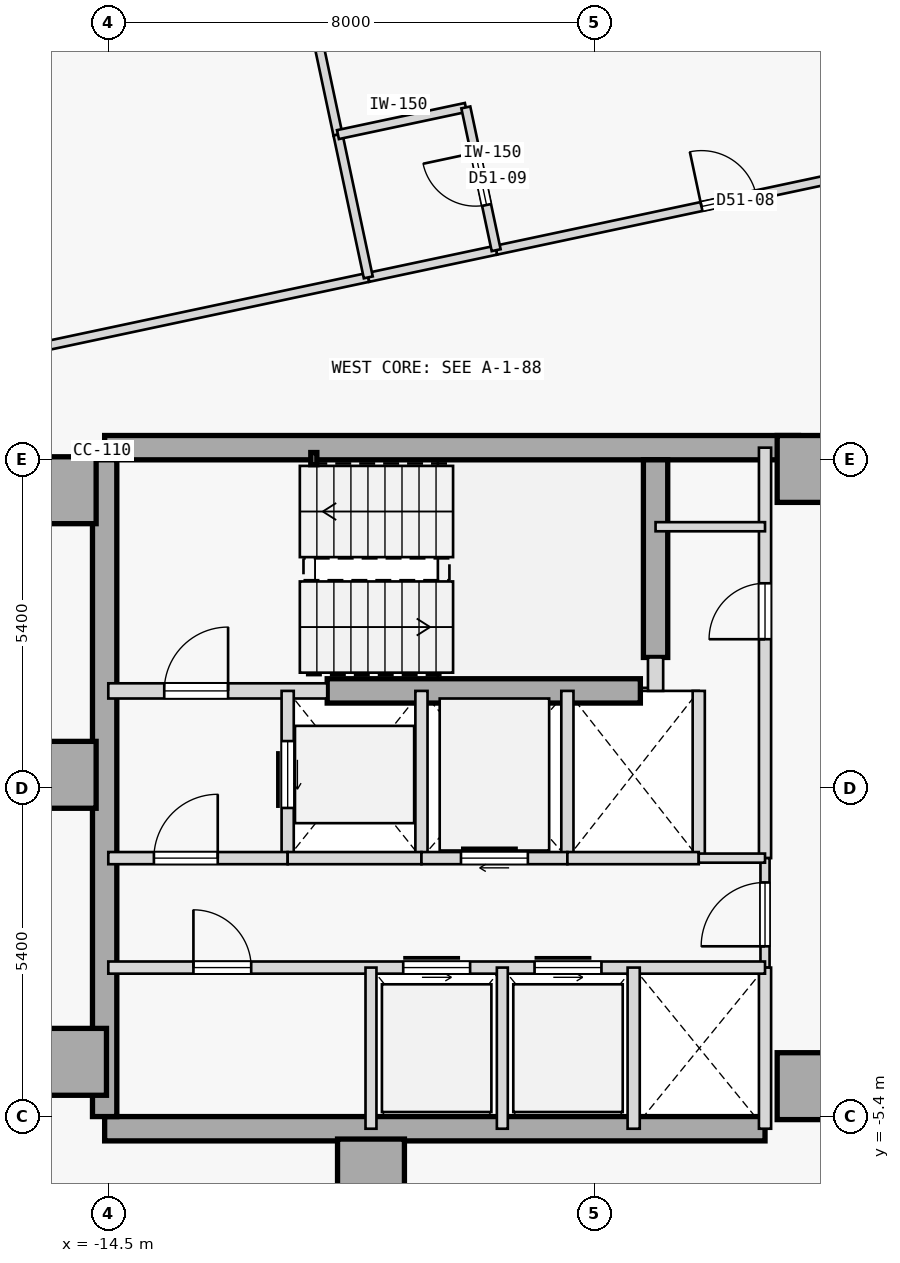
"""IFC4 building model, lengths in metres.
Left out: names, types, materials, properties, quantities, classifications, styles, units other than length and angle.
Written with IfcOpenShell. Run it as: python <this file> out.ifc"""

import sys

from ifc_helpers import new_model, si_unit, direction, frame, frame_2d, origin, origin_2d, place, context, subcontext, project, spatial, rectangle, hollow_rectangle, extrude, element, fill, save


model = new_model("IFC4")
c1 = context("Model", 3, precision=1e-05, world=origin(), true_north=direction((0.0, 1.0)))
c2 = subcontext(c1, "Body", "Model", "MODEL_VIEW")
j1 = project(units=[si_unit("LENGTHUNIT", "METRE"), si_unit("PLANEANGLEUNIT", "RADIAN")], contexts=[c1])
p1 = place(None, origin())
s1 = spatial("IfcSite", under=j1, at=p1, CompositionType="ELEMENT")
p2 = place(p1, origin())
s2 = spatial("IfcBuilding", under=s1, at=p2, CompositionType="ELEMENT")
p3 = place(p2, frame((0.0, 0.0, 195.6)))
s3 = spatial("IfcBuildingStorey", under=s2, at=p3, CompositionType="ELEMENT", Elevation=195.6)
for number, where, z_axis, x_axis in (
    (1, (-15.25, 4.9, 0.0), (0.0, 0.0, 1.0), (1.0, 0.0, 0.0)),
    (2, (-15.25, 0.22, 0.0), (0.0, 0.0, 1.0), (1.0, 0.0, 0.0)),
    (3, (-15.08, -4.5, 0.0), (0.0, 0.0, 1.0), (1.0, 0.0, 0.0)),
    (4, (-10.18, -6.32, 0.0), (0.0, 0.0, 1.0), (1.0, 0.0, 0.0)),
    (5, (-2.95, -4.9, 0.0), (0.0, 0.0, 1.0), (1.0, 0.0, 0.0)),
    (6, (-2.95, 5.25, 0.0), (0.0, 0.0, 1.0), (1.0, 0.0, 0.0)),
):
    element("IfcColumn", number, at=place(p3, frame(where, z_axis=z_axis, x_axis=x_axis)), inside=s3, PredefinedType="COLUMN", context=c2, shape_type="SweptSolid", body=[
        extrude(rectangle(XDim=1.1, YDim=1.1, at=origin_2d()), origin(), (0.0, 0.0, 1.0), 3.4),
    ])
p4 = place(p3, frame((-14.56, 5.6, 0.0), z_axis=(0.0, 0.0, 1.0), x_axis=(1.0, 0.0, 0.0)))
e7 = element("IfcWall", 7, at=p4, inside=s3, PredefinedType="SHEAR", context=c2, shape_type="SweptSolid", body=[
    extrude(rectangle(XDim=11.41, YDim=0.4, at=frame_2d((5.705, 0.0))), origin(), (0.0, 0.0, 1.0), 3.175),
])
p5 = place(p3, frame((-14.56, -5.6, 0.0), z_axis=(0.0, 0.0, 1.0), x_axis=(1.0, 0.0, 0.0)))
e8 = element("IfcWall", 8, at=p5, inside=s3, PredefinedType="SHEAR", context=c2, shape_type="SweptSolid", body=[
    extrude(rectangle(XDim=10.86, YDim=0.4, at=frame_2d((5.43, 0.0))), origin(), (0.0, 0.0, 1.0), 3.175),
])
p6 = place(p3, frame((-14.56, -5.4, 0.0), z_axis=(0.0, 0.0, 1.0), x_axis=(0.0, 1.0, 0.0)))
e9 = element("IfcWall", 9, at=p6, inside=s3, PredefinedType="SHEAR", context=c2, shape_type="SweptSolid", body=[
    extrude(rectangle(XDim=10.8, YDim=0.4, at=frame_2d((5.4, 0.0))), origin(), (0.0, 0.0, 1.0), 3.175),
])
p7 = place(p3, frame((-5.5, 2.15, 0.0), z_axis=(0.0, 0.0, 1.0), x_axis=(0.0, 1.0, 0.0)))
e10 = element("IfcWall", 10, at=p7, inside=s3, PredefinedType="SHEAR", context=c2, shape_type="SweptSolid", body=[
    extrude(rectangle(XDim=3.25, YDim=0.4, at=frame_2d((1.625, 0.0))), origin(), (0.0, 0.0, 1.0), 3.175),
])
p8 = place(p3, frame((-10.9, 1.6, 0.0), z_axis=(0.0, 0.0, 1.0), x_axis=(1.0, 0.0, 0.0)))
e11 = element("IfcWall", 11, at=p8, inside=s3, PredefinedType="SHEAR", context=c2, shape_type="SweptSolid", body=[
    extrude(rectangle(XDim=5.15, YDim=0.4, at=frame_2d((2.575, 0.0))), origin(), (0.0, 0.0, 1.0), 3.175),
])
p9 = place(p3, frame((-11.12, 5.42, 0.0), z_axis=(0.0, 0.0, 1.0), x_axis=(1.0, 0.0, 0.0)))
e12 = element("IfcColumn", 12, at=p9, inside=s3, PredefinedType="COLUMN", context=c2, shape_type="SweptSolid", body=[
    extrude(hollow_rectangle(XDim=0.1, YDim=0.2, WallThickness=0.008, at=origin_2d()), origin(), (0.0, 0.0, 1.0), 3.4),
])
p10 = place(p3, frame((-14.5, 1.6, 0.0), z_axis=(0.0, 0.0, 1.0), x_axis=(1.0, 0.0, 0.0)))
e13 = element("IfcWall", 13, at=p10, inside=s3, PredefinedType="STANDARD", context=c2, shape_type="SweptSolid", body=[
    extrude(rectangle(XDim=3.6, YDim=0.25, at=frame_2d((1.8, 0.0))), origin(), (0.0, 0.0, 1.0), 3.175),
])
p11 = place(p10, frame((0.92, 0.0, 0.0)))
e14 = element("IfcOpeningElement", 14, at=p11, cuts=e13, PredefinedType="OPENING", context=c2, shape_type="SweptSolid", body=[
    extrude(rectangle(XDim=1.05, YDim=2.15, at=frame_2d((0.525, 1.075))), frame((0.0, 0.135, 0.0), z_axis=(0.0, -1.0, 0.0), x_axis=(1.0, 0.0, 0.0)), (0.0, 0.0, 1.0), 0.27),
])
p12 = place(p3, frame((-5.5, 1.6, 0.0), z_axis=(0.0, 0.0, 1.0), x_axis=(0.0, 1.0, 0.0)))
e15 = element("IfcWall", 15, at=p12, inside=s3, PredefinedType="STANDARD", context=c2, shape_type="SweptSolid", body=[
    extrude(rectangle(XDim=0.55, YDim=0.25, at=frame_2d((0.275, 0.0))), origin(), (0.0, 0.0, 1.0), 3.175),
])
p13 = place(p3, frame((-3.7, -1.15, 0.0), z_axis=(0.0, 0.0, 1.0), x_axis=(0.0, 1.0, 0.0)))
e16 = element("IfcWall", 16, at=p13, inside=s3, PredefinedType="STANDARD", context=c2, shape_type="SweptSolid", body=[
    extrude(rectangle(XDim=6.75, YDim=0.2, at=frame_2d((3.375, 0.0))), origin(), (0.0, 0.0, 1.0), 3.175),
])
p14 = place(p13, frame((3.6, 0.0, 0.0)))
e17 = element("IfcOpeningElement", 17, at=p14, cuts=e16, PredefinedType="OPENING", context=c2, shape_type="SweptSolid", body=[
    extrude(rectangle(XDim=0.92, YDim=2.15, at=frame_2d((0.46, 1.075))), frame((0.0, 0.11, 0.0), z_axis=(0.0, -1.0, 0.0), x_axis=(1.0, 0.0, 0.0)), (0.0, 0.0, 1.0), 0.22),
])
p15 = place(p3, frame((-3.7, -2.95, 0.0), z_axis=(0.0, 0.0, 1.0), x_axis=(0.0, 1.0, 0.0)))
e18 = element("IfcWall", 18, at=p15, inside=s3, PredefinedType="PARTITIONING", context=c2, shape_type="SweptSolid", body=[
    extrude(rectangle(XDim=1.8, YDim=0.15, at=frame_2d((0.9, 0.0))), origin(), (0.0, 0.0, 1.0), 3.175),
])
p16 = place(p15, frame((0.35, 0.0, 0.0)))
e19 = element("IfcOpeningElement", 19, at=p16, cuts=e18, PredefinedType="OPENING", context=c2, shape_type="SweptSolid", body=[
    extrude(rectangle(XDim=1.05, YDim=2.18, at=frame_2d((0.525, 1.09))), frame((0.0, 0.085, 0.0), z_axis=(0.0, -1.0, 0.0), x_axis=(1.0, 0.0, 0.0)), (0.0, 0.0, 1.0), 0.17),
])
p17 = place(p3, frame((-3.7, -5.6, 0.0), z_axis=(0.0, 0.0, 1.0), x_axis=(0.0, 1.0, 0.0)))
e20 = element("IfcWall", 20, at=p17, inside=s3, PredefinedType="STANDARD", context=c2, shape_type="SweptSolid", body=[
    extrude(rectangle(XDim=2.65, YDim=0.2, at=frame_2d((1.325, 0.0))), origin(), (0.0, 0.0, 1.0), 3.175),
])
p18 = place(p3, frame((-11.55, -1.15, 0.0), z_axis=(0.0, 0.0, 1.0), x_axis=(0.0, 1.0, 0.0)))
e21 = element("IfcWall", 21, at=p18, inside=s3, PredefinedType="STANDARD", context=c2, shape_type="SweptSolid", body=[
    extrude(rectangle(XDim=2.75, YDim=0.2, at=frame_2d((1.375, 0.0))), origin(), (0.0, 0.0, 1.0), 3.175),
])
p19 = place(p18, frame((0.825, 0.0, 0.0)))
e22 = element("IfcOpeningElement", 22, at=p19, cuts=e21, PredefinedType="OPENING", context=c2, shape_type="SweptSolid", body=[
    extrude(rectangle(XDim=1.1, YDim=2.15, at=frame_2d((0.55, 1.075))), frame((0.0, 0.11, 0.0), z_axis=(0.0, -1.0, 0.0), x_axis=(1.0, 0.0, 0.0)), (0.0, 0.0, 1.0), 0.22),
])
p20 = place(p3, frame((-9.35, -1.15, 0.0), z_axis=(0.0, 0.0, 1.0), x_axis=(0.0, 1.0, 0.0)))
e23 = element("IfcWall", 23, at=p20, inside=s3, PredefinedType="STANDARD", context=c2, shape_type="SweptSolid", body=[
    extrude(rectangle(XDim=2.75, YDim=0.2, at=frame_2d((1.375, 0.0))), origin(), (0.0, 0.0, 1.0), 3.175),
])
p21 = place(p3, frame((-14.5, -1.15, 0.0), z_axis=(0.0, 0.0, 1.0), x_axis=(1.0, 0.0, 0.0)))
e24 = element("IfcWall", 24, at=p21, inside=s3, PredefinedType="STANDARD", context=c2, shape_type="SweptSolid", body=[
    extrude(rectangle(XDim=2.95, YDim=0.2, at=frame_2d((1.475, 0.0))), origin(), (0.0, 0.0, 1.0), 3.175),
])
p22 = place(p21, frame((0.75, 0.0, 0.0)))
e25 = element("IfcOpeningElement", 25, at=p22, cuts=e24, PredefinedType="OPENING", context=c2, shape_type="SweptSolid", body=[
    extrude(rectangle(XDim=1.05, YDim=2.18, at=frame_2d((0.525, 1.09))), frame((0.0, 0.11, 0.0), z_axis=(0.0, -1.0, 0.0), x_axis=(1.0, 0.0, 0.0)), (0.0, 0.0, 1.0), 0.22),
])
p23 = place(p3, frame((-11.55, -1.15, 0.0), z_axis=(0.0, 0.0, 1.0), x_axis=(1.0, 0.0, 0.0)))
e26 = element("IfcWall", 26, at=p23, inside=s3, PredefinedType="STANDARD", context=c2, shape_type="SweptSolid", body=[
    extrude(rectangle(XDim=2.2, YDim=0.2, at=frame_2d((1.1, 0.0))), origin(), (0.0, 0.0, 1.0), 3.175),
])
p24 = place(p3, frame((-6.95, -1.15, 0.0), z_axis=(0.0, 0.0, 1.0), x_axis=(0.0, 1.0, 0.0)))
e27 = element("IfcWall", 27, at=p24, inside=s3, PredefinedType="STANDARD", context=c2, shape_type="SweptSolid", body=[
    extrude(rectangle(XDim=2.75, YDim=0.2, at=frame_2d((1.375, 0.0))), origin(), (0.0, 0.0, 1.0), 3.175),
])
p25 = place(p3, frame((-9.35, -1.15, 0.0), z_axis=(0.0, 0.0, 1.0), x_axis=(1.0, 0.0, 0.0)))
e28 = element("IfcWall", 28, at=p25, inside=s3, PredefinedType="STANDARD", context=c2, shape_type="SweptSolid", body=[
    extrude(rectangle(XDim=2.4, YDim=0.2, at=frame_2d((1.2, 0.0))), origin(), (0.0, 0.0, 1.0), 3.175),
])
p26 = place(p25, frame((0.65, 0.0, 0.0)))
e29 = element("IfcOpeningElement", 29, at=p26, cuts=e28, PredefinedType="OPENING", context=c2, shape_type="SweptSolid", body=[
    extrude(rectangle(XDim=1.1, YDim=2.15, at=frame_2d((0.55, 1.075))), frame((0.0, 0.11, 0.0), z_axis=(0.0, -1.0, 0.0), x_axis=(1.0, 0.0, 0.0)), (0.0, 0.0, 1.0), 0.22),
])
p27 = place(p3, frame((-4.79, -1.15, 0.0), z_axis=(0.0, 0.0, 1.0), x_axis=(0.0, 1.0, 0.0)))
e30 = element("IfcWall", 30, at=p27, inside=s3, PredefinedType="STANDARD", context=c2, shape_type="SweptSolid", body=[
    extrude(rectangle(XDim=2.75, YDim=0.2, at=frame_2d((1.375, 0.0))), origin(), (0.0, 0.0, 1.0), 3.175),
])
p28 = place(p3, frame((-6.95, -1.15, 0.0), z_axis=(0.0, 0.0, 1.0), x_axis=(1.0, 0.0, 0.0)))
e31 = element("IfcWall", 31, at=p28, inside=s3, PredefinedType="STANDARD", context=c2, shape_type="SweptSolid", body=[
    extrude(rectangle(XDim=2.16, YDim=0.2, at=frame_2d((1.08, 0.0))), origin(), (0.0, 0.0, 1.0), 3.175),
])
p29 = place(p3, frame((-4.79, -1.15, 0.0), z_axis=(0.0, 0.0, 1.0), x_axis=(1.0, 0.0, 0.0)))
e32 = element("IfcWall", 32, at=p29, inside=s3, PredefinedType="PARTITIONING", context=c2, shape_type="SweptSolid", body=[
    extrude(rectangle(XDim=1.09, YDim=0.15, at=frame_2d((0.545, 0.0))), origin(), (0.0, 0.0, 1.0), 3.175),
])
p30 = place(p3, frame((-14.5, -2.95, 0.0), z_axis=(0.0, 0.0, 1.0), x_axis=(1.0, 0.0, 0.0)))
e33 = element("IfcWall", 33, at=p30, inside=s3, PredefinedType="STANDARD", context=c2, shape_type="SweptSolid", body=[
    extrude(rectangle(XDim=10.8, YDim=0.2, at=frame_2d((5.4, 0.0))), origin(), (0.0, 0.0, 1.0), 3.175),
])
p31 = place(p30, frame((4.85, 0.0, 0.0)))
e34 = element("IfcOpeningElement", 34, at=p31, cuts=e33, PredefinedType="OPENING", context=c2, shape_type="SweptSolid", body=[
    extrude(rectangle(XDim=1.1, YDim=2.15, at=frame_2d((0.55, 1.075))), frame((0.0, 0.11, 0.0), z_axis=(0.0, -1.0, 0.0), x_axis=(1.0, 0.0, 0.0)), (0.0, 0.0, 1.0), 0.22),
])
p32 = place(p30, frame((7.01, 0.0, 0.0)))
e35 = element("IfcOpeningElement", 35, at=p32, cuts=e33, PredefinedType="OPENING", context=c2, shape_type="SweptSolid", body=[
    extrude(rectangle(XDim=1.1, YDim=2.15, at=frame_2d((0.55, 1.075))), frame((0.0, 0.11, 0.0), z_axis=(0.0, -1.0, 0.0), x_axis=(1.0, 0.0, 0.0)), (0.0, 0.0, 1.0), 0.22),
])
p33 = place(p30, frame((1.4, 0.0, 0.0)))
e36 = element("IfcOpeningElement", 36, at=p33, cuts=e33, PredefinedType="OPENING", context=c2, shape_type="SweptSolid", body=[
    extrude(rectangle(XDim=0.95, YDim=2.15, at=frame_2d((0.475, 1.075))), frame((0.0, 0.11, 0.0), z_axis=(0.0, -1.0, 0.0), x_axis=(1.0, 0.0, 0.0)), (0.0, 0.0, 1.0), 0.22),
])
p34 = place(p3, frame((-5.86, -5.6, 0.0), z_axis=(0.0, 0.0, 1.0), x_axis=(0.0, 1.0, 0.0)))
e37 = element("IfcWall", 37, at=p34, inside=s3, PredefinedType="STANDARD", context=c2, shape_type="SweptSolid", body=[
    extrude(rectangle(XDim=2.65, YDim=0.2, at=frame_2d((1.325, 0.0))), origin(), (0.0, 0.0, 1.0), 3.175),
])
for number, where, z_axis, x_axis in (
    (38, (-10.18, -5.6, 0.0), (0.0, 0.0, 1.0), (0.0, 1.0, 0.0)),
    (39, (-8.02, -5.6, 0.0), (0.0, 0.0, 1.0), (0.0, 1.0, 0.0)),
):
    element("IfcWall", number, at=place(p3, frame(where, z_axis=z_axis, x_axis=x_axis)), inside=s3, PredefinedType="STANDARD", context=c2, shape_type="SweptSolid", body=[
        extrude(rectangle(XDim=2.65, YDim=0.18, at=frame_2d((1.325, 0.0))), origin(), (0.0, 0.0, 1.0), 3.175),
    ])
p35 = place(p3, frame((-5.5, 4.3, 0.0), z_axis=(0.0, 0.0, 1.0), x_axis=(1.0, 0.0, 0.0)))
e40 = element("IfcWall", 40, at=p35, inside=s3, PredefinedType="PARTITIONING", context=c2, shape_type="SweptSolid", body=[
    extrude(rectangle(XDim=1.8, YDim=0.15, at=frame_2d((0.9, 0.0))), origin(), (0.0, 0.0, 1.0), 3.175),
])
p36 = place(p3, frame((-17.162, 6.926, 0.0), z_axis=(0.0, 0.0, 1.0), x_axis=(0.978143627193, 0.207930383978, 0.0)))
e41 = element("IfcWall", 41, at=p36, inside=s3, PredefinedType="PARTITIONING", context=c2, shape_type="SweptSolid", body=[
    extrude(rectangle(XDim=7.093, YDim=0.15, at=frame_2d((3.546, 0.0))), origin(), (0.0, 0.0, 1.0), 3.175),
])
p37 = place(p3, frame((-8.121, 8.848, 0.0), z_axis=(0.0, 0.0, 1.0), x_axis=(0.978146318695, 0.207917722244, 0.0)))
e42 = element("IfcWall", 42, at=p37, inside=s3, PredefinedType="PARTITIONING", context=c2, shape_type="SweptSolid", body=[
    extrude(rectangle(XDim=7.824, YDim=0.15, at=frame_2d((3.912, 0.0))), origin(), (0.0, 0.0, 1.0), 3.175),
])
p38 = place(p37, frame((3.452, 0.0, 0.0)))
e43 = element("IfcOpeningElement", 43, at=p38, cuts=e42, PredefinedType="OPENING", context=c2, shape_type="SweptSolid", body=[
    extrude(rectangle(XDim=0.92, YDim=2.15, at=frame_2d((0.46, 1.075))), frame((0.0, 0.085, 0.0), z_axis=(0.0, -1.0, 0.0), x_axis=(1.0, 0.0, 0.0)), (0.0, 0.0, 1.0), 0.17),
])
p39 = place(p3, frame((-10.224, 8.401, 0.0), z_axis=(0.0, 0.0, 1.0), x_axis=(0.978146728319, 0.207915795165, 0.0)))
e44 = element("IfcWall", 44, at=p39, inside=s3, PredefinedType="PARTITIONING", context=c2, shape_type="SweptSolid", body=[
    extrude(rectangle(XDim=2.15, YDim=0.15, at=frame_2d((1.075, 0.0))), origin(), (0.0, 0.0, 1.0), 3.175),
])
p40 = place(p3, frame((-10.723, 10.748, 0.0), z_axis=(0.0, 0.0, 1.0), x_axis=(-0.207914988081, 0.978146899873, 0.0)))
e45 = element("IfcWall", 45, at=p40, inside=s3, PredefinedType="PARTITIONING", context=c2, shape_type="SweptSolid", body=[
    extrude(rectangle(XDim=11.995, YDim=0.15, at=frame_2d((5.998, 0.0))), origin(), (0.0, 0.0, 1.0), 3.175),
])
p41 = place(p3, frame((-10.224, 8.401, 0.0), z_axis=(0.0, 0.0, 1.0), x_axis=(-0.207917150959, 0.978146440129, 0.0)))
e46 = element("IfcWall", 46, at=p41, inside=s3, PredefinedType="PARTITIONING", context=c2, shape_type="SweptSolid", body=[
    extrude(rectangle(XDim=2.4, YDim=0.15, at=frame_2d((1.2, 0.0))), origin(), (0.0, 0.0, 1.0), 3.175),
])
p42 = place(p3, frame((-10.723, 10.748, 0.0), z_axis=(0.0, 0.0, 1.0), x_axis=(0.978146728319, 0.207915795165, 0.0)))
e47 = element("IfcWall", 47, at=p42, inside=s3, PredefinedType="PARTITIONING", context=c2, shape_type="SweptSolid", body=[
    extrude(rectangle(XDim=2.15, YDim=0.15, at=frame_2d((1.075, 0.0))), origin(), (0.0, 0.0, 1.0), 3.175),
])
p43 = place(p3, frame((-8.121, 8.848, 0.0), z_axis=(0.0, 0.0, 1.0), x_axis=(-0.207917150959, 0.978146440129, 0.0)))
e48 = element("IfcWall", 48, at=p43, inside=s3, PredefinedType="PARTITIONING", context=c2, shape_type="SweptSolid", body=[
    extrude(rectangle(XDim=2.4, YDim=0.15, at=frame_2d((1.2, 0.0))), origin(), (0.0, 0.0, 1.0), 3.175),
])
p44 = place(p43, frame((0.76, 0.0, 0.0)))
e49 = element("IfcOpeningElement", 49, at=p44, cuts=e48, PredefinedType="OPENING", context=c2, shape_type="SweptSolid", body=[
    extrude(rectangle(XDim=0.88, YDim=2.15, at=frame_2d((0.44, 1.075))), frame((0.0, 0.085, 0.0), z_axis=(0.0, -1.0, 0.0), x_axis=(1.0, 0.0, 0.0)), (0.0, 0.0, 1.0), 0.17),
])
p45 = place(p11, origin())
e50 = element("IfcDoor", 50, at=p45, inside=s3, OperationType="SINGLE_SWING_RIGHT", PredefinedType="DOOR", context=c2, shape_type="SweptSolid", body=[
    extrude(rectangle(XDim=1.05, YDim=2.15, at=frame_2d((0.525, 1.075))), frame((0.0, 0.025, 0.0), z_axis=(0.0, -1.0, 0.0), x_axis=(1.0, 0.0, 0.0)), (0.0, 0.0, 1.0), 0.05),
])
fill(e14, e50)
p46 = place(p22, origin())
e51 = element("IfcDoor", 51, at=p46, inside=s3, OperationType="SINGLE_SWING_RIGHT", PredefinedType="DOOR", context=c2, shape_type="SweptSolid", body=[
    extrude(rectangle(XDim=1.05, YDim=2.18, at=frame_2d((0.525, 1.09))), frame((0.0, 0.025, 0.0), z_axis=(0.0, -1.0, 0.0), x_axis=(1.0, 0.0, 0.0)), (0.0, 0.0, 1.0), 0.05),
])
fill(e25, e51)
p47 = place(p16, origin())
e52 = element("IfcDoor", 52, at=p47, inside=s3, OperationType="SINGLE_SWING_LEFT", PredefinedType="DOOR", context=c2, shape_type="SweptSolid", body=[
    extrude(rectangle(XDim=1.05, YDim=2.18, at=frame_2d((0.525, 1.09))), frame((0.0, 0.025, 0.0), z_axis=(0.0, -1.0, 0.0), x_axis=(1.0, 0.0, 0.0)), (0.0, 0.0, 1.0), 0.05),
])
fill(e19, e52)
p48 = place(p19, origin())
e53 = element("IfcDoor", 53, at=p48, inside=s3, OperationType="SLIDING_TO_RIGHT", PredefinedType="DOOR", context=c2, shape_type="SweptSolid", body=[
    extrude(rectangle(XDim=1.1, YDim=2.15, at=frame_2d((0.55, 1.075))), frame((0.0, 0.025, 0.0), z_axis=(0.0, -1.0, 0.0), x_axis=(1.0, 0.0, 0.0)), (0.0, 0.0, 1.0), 0.05),
])
fill(e22, e53)
p49 = place(p26, origin())
e54 = element("IfcDoor", 54, at=p49, inside=s3, OperationType="SLIDING_TO_RIGHT", PredefinedType="DOOR", context=c2, shape_type="SweptSolid", body=[
    extrude(rectangle(XDim=1.1, YDim=2.15, at=frame_2d((0.55, 1.075))), frame((0.0, 0.025, 0.0), z_axis=(0.0, -1.0, 0.0), x_axis=(1.0, 0.0, 0.0)), (0.0, 0.0, 1.0), 0.05),
])
fill(e29, e54)
p50 = place(p31, origin())
e55 = element("IfcDoor", 55, at=p50, inside=s3, OperationType="SLIDING_TO_LEFT", PredefinedType="DOOR", context=c2, shape_type="SweptSolid", body=[
    extrude(rectangle(XDim=1.1, YDim=2.15, at=frame_2d((0.55, 1.075))), frame((0.0, 0.025, 0.0), z_axis=(0.0, -1.0, 0.0), x_axis=(1.0, 0.0, 0.0)), (0.0, 0.0, 1.0), 0.05),
])
fill(e34, e55)
p51 = place(p32, origin())
e56 = element("IfcDoor", 56, at=p51, inside=s3, OperationType="SLIDING_TO_LEFT", PredefinedType="DOOR", context=c2, shape_type="SweptSolid", body=[
    extrude(rectangle(XDim=1.1, YDim=2.15, at=frame_2d((0.55, 1.075))), frame((0.0, 0.025, 0.0), z_axis=(0.0, -1.0, 0.0), x_axis=(1.0, 0.0, 0.0)), (0.0, 0.0, 1.0), 0.05),
])
fill(e35, e56)
p52 = place(p33, origin())
e57 = element("IfcDoor", 57, at=p52, inside=s3, OperationType="SINGLE_SWING_LEFT", PredefinedType="DOOR", context=c2, shape_type="SweptSolid", body=[
    extrude(rectangle(XDim=0.95, YDim=2.15, at=frame_2d((0.475, 1.075))), frame((0.0, 0.025, 0.0), z_axis=(0.0, -1.0, 0.0), x_axis=(1.0, 0.0, 0.0)), (0.0, 0.0, 1.0), 0.05),
])
fill(e36, e57)
p53 = place(p14, origin())
e58 = element("IfcDoor", 58, at=p53, inside=s3, OperationType="SINGLE_SWING_LEFT", PredefinedType="DOOR", context=c2, shape_type="SweptSolid", body=[
    extrude(rectangle(XDim=0.92, YDim=2.15, at=frame_2d((0.46, 1.075))), frame((0.0, 0.025, 0.0), z_axis=(0.0, -1.0, 0.0), x_axis=(1.0, 0.0, 0.0)), (0.0, 0.0, 1.0), 0.05),
])
fill(e17, e58)
p54 = place(p38, origin())
e59 = element("IfcDoor", 59, at=p54, inside=s3, OperationType="SINGLE_SWING_LEFT", PredefinedType="DOOR", context=c2, shape_type="SweptSolid", body=[
    extrude(rectangle(XDim=0.92, YDim=2.15, at=frame_2d((0.46, 1.075))), frame((0.0, 0.025, 0.0), z_axis=(0.0, -1.0, 0.0), x_axis=(1.0, 0.0, 0.0)), (0.0, 0.0, 1.0), 0.05),
])
fill(e43, e59)
p55 = place(p44, origin())
e60 = element("IfcDoor", 60, at=p55, inside=s3, OperationType="SINGLE_SWING_RIGHT", PredefinedType="DOOR", context=c2, shape_type="SweptSolid", body=[
    extrude(rectangle(XDim=0.88, YDim=2.15, at=frame_2d((0.44, 1.075))), frame((0.0, 0.025, 0.0), z_axis=(0.0, -1.0, 0.0), x_axis=(1.0, 0.0, 0.0)), (0.0, 0.0, 1.0), 0.05),
])
fill(e49, e60)
save(model, sys.argv[1])
